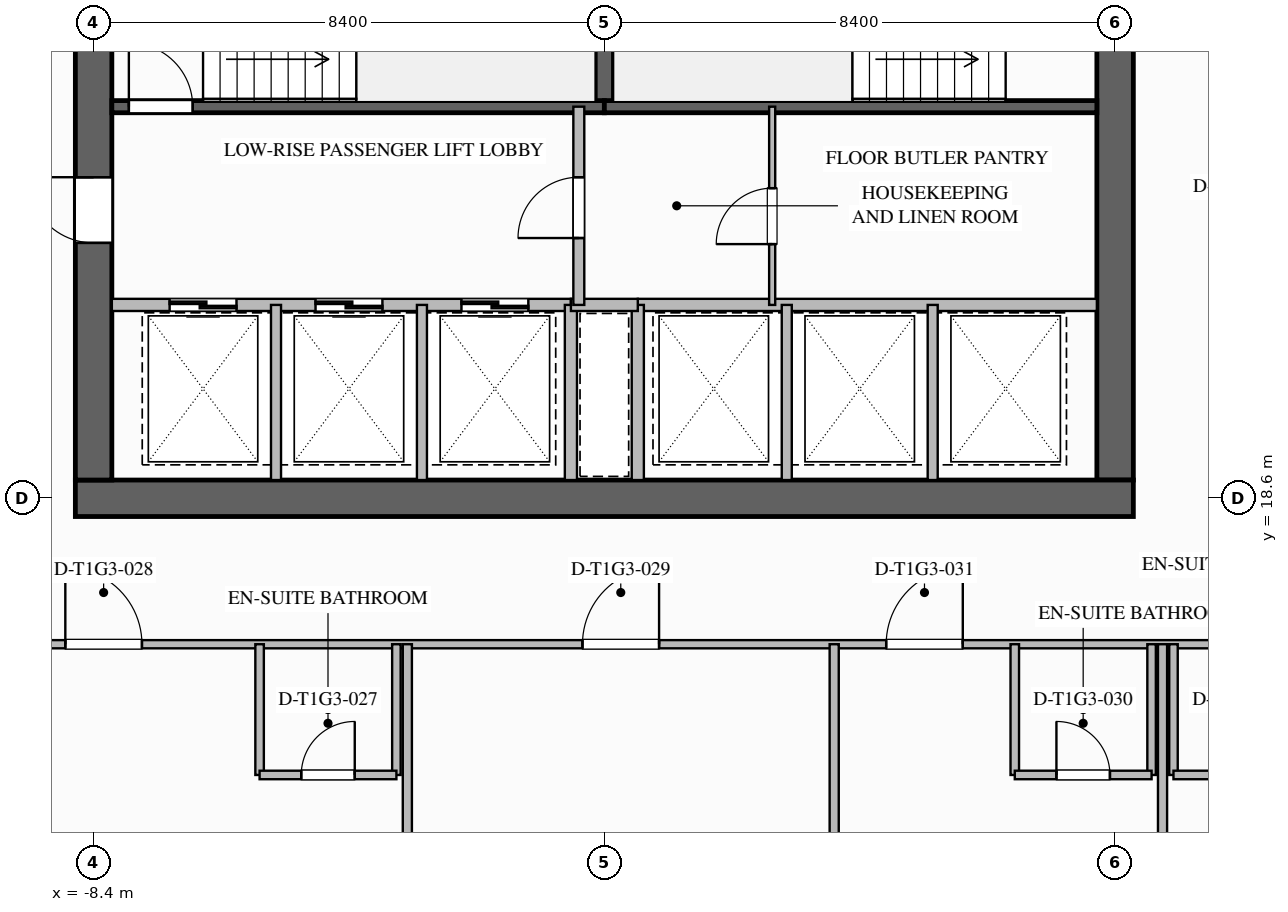
"""IFC4 building model, lengths in metres.
Left out: names, types, materials, properties, quantities, classifications, styles, units other than length and angle.
Written with IfcOpenShell. Run it as: python <this file> out.ifc"""

import sys

from ifc_helpers import new_model, si_unit, direction, frame, frame_2d, origin, place, context, subcontext, project, spatial, rectangle, extrude, element, fill, save


model = new_model("IFC4")
c1 = context("Model", 3, precision=1e-05, world=origin(), true_north=direction((0.0, 1.0)))
c2 = subcontext(c1, "Body", "Model", "MODEL_VIEW")
j1 = project(units=[si_unit("LENGTHUNIT", "METRE"), si_unit("PLANEANGLEUNIT", "RADIAN")], contexts=[c1])
p1 = place(None, origin())
s1 = spatial("IfcSite", under=j1, at=p1, CompositionType="ELEMENT")
p2 = place(p1, origin())
s2 = spatial("IfcBuilding", under=s1, at=p2, CompositionType="ELEMENT")
p3 = place(p2, frame((0.0, 0.0, 54.2)))
s3 = spatial("IfcBuildingStorey", under=s2, at=p3, CompositionType="ELEMENT", Elevation=54.2)
p4 = place(p3, frame((8.4, 35.1, 0.0), z_axis=(0.0, 0.0, 1.0), x_axis=(0.0, -1.0, 0.0)))
e1 = element("IfcWall", 1, at=p4, inside=s3, PredefinedType="SHEAR", context=c2, shape_type="SweptSolid", body=[
    extrude(rectangle(XDim=16.2, YDim=0.6, at=frame_2d((8.1, 0.0))), origin(), (0.0, 0.0, 1.0), 3.5),
])
p5 = place(p4, frame((3.08, 0.0, 0.0)))
e2 = element("IfcOpeningElement", 2, at=p5, cuts=e1, PredefinedType="OPENING", context=c2, shape_type="SweptSolid", body=[
    extrude(rectangle(XDim=1.12, YDim=2.1, at=frame_2d((0.56, 1.05))), frame((0.0, 0.31, 0.0), z_axis=(0.0, -1.0, 0.0), x_axis=(1.0, 0.0, 0.0)), (0.0, 0.0, 1.0), 0.62),
])
p6 = place(p3, frame((8.7, 18.6, 0.0), z_axis=(0.0, 0.0, 1.0), x_axis=(-1.0, 0.0, 0.0)))
e3 = element("IfcWall", 3, at=p6, inside=s3, PredefinedType="SHEAR", context=c2, shape_type="SweptSolid", body=[
    extrude(rectangle(XDim=17.4, YDim=0.6, at=frame_2d((8.7, 0.0))), origin(), (0.0, 0.0, 1.0), 3.5),
])
p7 = place(p3, frame((-8.4, 18.9, 0.0), z_axis=(0.0, 0.0, 1.0), x_axis=(0.0, 1.0, 0.0)))
e4 = element("IfcWall", 4, at=p7, inside=s3, PredefinedType="SHEAR", context=c2, shape_type="SweptSolid", body=[
    extrude(rectangle(XDim=16.2, YDim=0.6, at=frame_2d((8.1, 0.0))), origin(), (0.0, 0.0, 1.0), 3.5),
])
p8 = place(p7, frame((3.9, 0.0, 0.0)))
e5 = element("IfcOpeningElement", 5, at=p8, cuts=e4, PredefinedType="OPENING", context=c2, shape_type="SweptSolid", body=[
    extrude(rectangle(XDim=1.08, YDim=2.04, at=frame_2d((0.54, 1.02))), frame((0.0, 0.31, 0.0), z_axis=(0.0, -1.0, 0.0), x_axis=(1.0, 0.0, 0.0)), (0.0, 0.0, 1.0), 0.62),
])
p9 = place(p3, frame((0.0, 25.04, 0.0), z_axis=(0.0, 0.0, 1.0), x_axis=(0.0, 1.0, 0.0)))
e6 = element("IfcWall", 6, at=p9, inside=s3, PredefinedType="SOLIDWALL", context=c2, shape_type="SweptSolid", body=[
    extrude(rectangle(XDim=3.12, YDim=0.3, at=frame_2d((1.56, 0.0))), origin(), (0.0, 0.0, 1.0), 3.24),
])
p10 = place(p3, frame((-8.1, 25.04, 0.0), z_axis=(0.0, 0.0, 1.0), x_axis=(1.0, 0.0, 0.0)))
e7 = element("IfcWall", 7, at=p10, inside=s3, PredefinedType="SOLIDWALL", context=c2, shape_type="SweptSolid", body=[
    extrude(rectangle(XDim=8.1, YDim=0.2, at=frame_2d((4.05, 0.0))), origin(), (0.0, 0.0, 1.0), 3.24),
])
p11 = place(p10, frame((0.28, 0.0, 0.0)))
e8 = element("IfcOpeningElement", 8, at=p11, cuts=e7, PredefinedType="OPENING", context=c2, shape_type="SweptSolid", body=[
    extrude(rectangle(XDim=1.05, YDim=2.1, at=frame_2d((0.525, 1.05))), frame((0.0, 0.11, 0.0), z_axis=(0.0, -1.0, 0.0), x_axis=(1.0, 0.0, 0.0)), (0.0, 0.0, 1.0), 0.22),
])
p12 = place(p3, frame((0.0, 25.04, 0.0), z_axis=(0.0, 0.0, 1.0), x_axis=(1.0, 0.0, 0.0)))
e9 = element("IfcWall", 9, at=p12, inside=s3, PredefinedType="SOLIDWALL", context=c2, shape_type="SweptSolid", body=[
    extrude(rectangle(XDim=8.1, YDim=0.2, at=frame_2d((4.05, 0.0))), origin(), (0.0, 0.0, 1.0), 3.24),
])
p13 = place(p3, frame((-0.55, 21.78, 0.0), z_axis=(0.0, 0.0, 1.0), x_axis=(-1.0, 0.0, 0.0)))
e10 = element("IfcWall", 10, at=p13, inside=s3, PredefinedType="SOLIDWALL", context=c2, shape_type="SweptSolid", body=[
    extrude(rectangle(XDim=7.55, YDim=0.2, at=frame_2d((3.775, 0.0))), origin(), (0.0, 0.0, 1.0), 3.24),
])
p14 = place(p13, frame((5.5, 0.0, 0.0)))
e11 = element("IfcOpeningElement", 11, at=p14, cuts=e10, PredefinedType="OPENING", context=c2, shape_type="SweptSolid", body=[
    extrude(rectangle(XDim=1.1, YDim=2.2, at=frame_2d((0.55, 1.1))), frame((0.0, 0.11, 0.0), z_axis=(0.0, -1.0, 0.0), x_axis=(1.0, 0.0, 0.0)), (0.0, 0.0, 1.0), 0.22),
])
p15 = place(p13, frame((3.1, 0.0, 0.0)))
e12 = element("IfcOpeningElement", 12, at=p15, cuts=e10, PredefinedType="OPENING", context=c2, shape_type="SweptSolid", body=[
    extrude(rectangle(XDim=1.1, YDim=2.2, at=frame_2d((0.55, 1.1))), frame((0.0, 0.11, 0.0), z_axis=(0.0, -1.0, 0.0), x_axis=(1.0, 0.0, 0.0)), (0.0, 0.0, 1.0), 0.22),
])
p16 = place(p13, frame((0.7, 0.0, 0.0)))
e13 = element("IfcOpeningElement", 13, at=p16, cuts=e10, PredefinedType="OPENING", context=c2, shape_type="SweptSolid", body=[
    extrude(rectangle(XDim=1.1, YDim=2.2, at=frame_2d((0.55, 1.1))), frame((0.0, 0.11, 0.0), z_axis=(0.0, -1.0, 0.0), x_axis=(1.0, 0.0, 0.0)), (0.0, 0.0, 1.0), 0.22),
])
for number, where, z_axis, x_axis in (
    (14, (-5.4, 18.9, 0.0), (0.0, 0.0, 1.0), (0.0, 1.0, 0.0)),
    (15, (-3.0, 18.9, 0.0), (0.0, 0.0, 1.0), (0.0, 1.0, 0.0)),
):
    element("IfcWall", number, at=place(p3, frame(where, z_axis=z_axis, x_axis=x_axis)), inside=s3, PredefinedType="PARTITIONING", context=c2, shape_type="SweptSolid", body=[
        extrude(rectangle(XDim=2.88, YDim=0.165, at=frame_2d((1.44, 0.0))), origin(), (0.0, 0.0, 1.0), 3.24),
    ])
p17 = place(p3, frame((-0.55, 18.9, 0.0), z_axis=(0.0, 0.0, 1.0), x_axis=(0.0, 1.0, 0.0)))
e16 = element("IfcWall", 16, at=p17, inside=s3, PredefinedType="SOLIDWALL", context=c2, shape_type="SweptSolid", body=[
    extrude(rectangle(XDim=2.88, YDim=0.2, at=frame_2d((1.44, 0.0))), origin(), (0.0, 0.0, 1.0), 3.24),
])
p18 = place(p3, frame((8.1, 21.78, 0.0), z_axis=(0.0, 0.0, 1.0), x_axis=(-1.0, 0.0, 0.0)))
e17 = element("IfcWall", 17, at=p18, inside=s3, PredefinedType="SOLIDWALL", context=c2, shape_type="SweptSolid", body=[
    extrude(rectangle(XDim=7.55, YDim=0.2, at=frame_2d((3.775, 0.0))), origin(), (0.0, 0.0, 1.0), 3.24),
])
p19 = place(p3, frame((0.55, 18.9, 0.0), z_axis=(0.0, 0.0, 1.0), x_axis=(0.0, 1.0, 0.0)))
e18 = element("IfcWall", 18, at=p19, inside=s3, PredefinedType="SOLIDWALL", context=c2, shape_type="SweptSolid", body=[
    extrude(rectangle(XDim=2.88, YDim=0.2, at=frame_2d((1.44, 0.0))), origin(), (0.0, 0.0, 1.0), 3.24),
])
for number, where, z_axis, x_axis in (
    (19, (3.0, 18.9, 0.0), (0.0, 0.0, 1.0), (0.0, 1.0, 0.0)),
    (20, (5.4, 18.9, 0.0), (0.0, 0.0, 1.0), (0.0, 1.0, 0.0)),
):
    element("IfcWall", number, at=place(p3, frame(where, z_axis=z_axis, x_axis=x_axis)), inside=s3, PredefinedType="PARTITIONING", context=c2, shape_type="SweptSolid", body=[
        extrude(rectangle(XDim=2.88, YDim=0.165, at=frame_2d((1.44, 0.0))), origin(), (0.0, 0.0, 1.0), 3.24),
    ])
p20 = place(p3, frame((-0.55, 21.78, 0.0), z_axis=(0.0, 0.0, 1.0), x_axis=(1.0, 0.0, 0.0)))
e21 = element("IfcWall", 21, at=p20, inside=s3, PredefinedType="SOLIDWALL", context=c2, shape_type="SweptSolid", body=[
    extrude(rectangle(XDim=1.1, YDim=0.2, at=frame_2d((0.55, 0.0))), origin(), (0.0, 0.0, 1.0), 3.24),
])
p21 = place(p3, frame((-0.42, 21.78, 0.0), z_axis=(0.0, 0.0, 1.0), x_axis=(0.0, 1.0, 0.0)))
e22 = element("IfcWall", 22, at=p21, inside=s3, PredefinedType="SOLIDWALL", context=c2, shape_type="SweptSolid", body=[
    extrude(rectangle(XDim=3.26, YDim=0.18, at=frame_2d((1.63, 0.0))), origin(), (0.0, 0.0, 1.0), 3.24),
])
p22 = place(p21, frame((1.1, 0.0, 0.0)))
e23 = element("IfcOpeningElement", 23, at=p22, cuts=e22, PredefinedType="OPENING", context=c2, shape_type="SweptSolid", body=[
    extrude(rectangle(XDim=1.0, YDim=2.1, at=frame_2d((0.5, 1.05))), frame((0.0, 0.1, 0.0), z_axis=(0.0, -1.0, 0.0), x_axis=(1.0, 0.0, 0.0)), (0.0, 0.0, 1.0), 0.2),
])
p23 = place(p3, frame((2.76, 21.78, 0.0), z_axis=(0.0, 0.0, 1.0), x_axis=(0.0, 1.0, 0.0)))
e24 = element("IfcWall", 24, at=p23, inside=s3, PredefinedType="PARTITIONING", context=c2, shape_type="SweptSolid", body=[
    extrude(rectangle(XDim=3.26, YDim=0.1, at=frame_2d((1.63, 0.0))), origin(), (0.0, 0.0, 1.0), 3.24),
])
p24 = place(p23, frame((1.0, 0.0, 0.0)))
e25 = element("IfcOpeningElement", 25, at=p24, cuts=e24, PredefinedType="OPENING", context=c2, shape_type="SweptSolid", body=[
    extrude(rectangle(XDim=0.92, YDim=2.1, at=frame_2d((0.46, 1.05))), frame((0.0, 0.06, 0.0), z_axis=(0.0, -1.0, 0.0), x_axis=(1.0, 0.0, 0.0)), (0.0, 0.0, 1.0), 0.12),
])
p25 = place(p3, frame((-16.2, 16.2, 0.0), z_axis=(0.0, 0.0, 1.0), x_axis=(1.0, 0.0, 0.0)))
e26 = element("IfcWall", 26, at=p25, inside=s3, PredefinedType="PARTITIONING", context=c2, shape_type="SweptSolid", body=[
    extrude(rectangle(XDim=32.4, YDim=0.135, at=frame_2d((16.2, 0.0))), origin(), (0.0, 0.0, 1.0), 3.24),
])
p26 = place(p25, frame((3.285, 0.0, 0.0)))
e27 = element("IfcOpeningElement", 27, at=p26, cuts=e26, PredefinedType="OPENING", context=c2, shape_type="SweptSolid", body=[
    extrude(rectangle(XDim=1.26, YDim=2.2, at=frame_2d((0.63, 1.1))), frame((0.0, 0.077, 0.0), z_axis=(0.0, -1.0, 0.0), x_axis=(1.0, 0.0, 0.0)), (0.0, 0.0, 1.0), 0.155),
])
p27 = place(p25, frame((7.335, 0.0, 0.0)))
e28 = element("IfcOpeningElement", 28, at=p27, cuts=e26, PredefinedType="OPENING", context=c2, shape_type="SweptSolid", body=[
    extrude(rectangle(XDim=1.26, YDim=2.2, at=frame_2d((0.63, 1.1))), frame((0.0, 0.077, 0.0), z_axis=(0.0, -1.0, 0.0), x_axis=(1.0, 0.0, 0.0)), (0.0, 0.0, 1.0), 0.155),
])
p28 = place(p25, frame((15.84, 0.0, 0.0)))
e29 = element("IfcOpeningElement", 29, at=p28, cuts=e26, PredefinedType="OPENING", context=c2, shape_type="SweptSolid", body=[
    extrude(rectangle(XDim=1.26, YDim=2.2, at=frame_2d((0.63, 1.1))), frame((0.0, 0.077, 0.0), z_axis=(0.0, -1.0, 0.0), x_axis=(1.0, 0.0, 0.0)), (0.0, 0.0, 1.0), 0.155),
])
p29 = place(p25, frame((20.835, 0.0, 0.0)))
e30 = element("IfcOpeningElement", 30, at=p29, cuts=e26, PredefinedType="OPENING", context=c2, shape_type="SweptSolid", body=[
    extrude(rectangle(XDim=1.26, YDim=2.2, at=frame_2d((0.63, 1.1))), frame((0.0, 0.077, 0.0), z_axis=(0.0, -1.0, 0.0), x_axis=(1.0, 0.0, 0.0)), (0.0, 0.0, 1.0), 0.155),
])
p30 = place(p25, frame((29.475, 0.0, 0.0)))
e31 = element("IfcOpeningElement", 31, at=p30, cuts=e26, PredefinedType="OPENING", context=c2, shape_type="SweptSolid", body=[
    extrude(rectangle(XDim=1.26, YDim=2.2, at=frame_2d((0.63, 1.1))), frame((0.0, 0.077, 0.0), z_axis=(0.0, -1.0, 0.0), x_axis=(1.0, 0.0, 0.0)), (0.0, 0.0, 1.0), 0.155),
])
for number, where, z_axis, x_axis in (
    (32, (-5.67, 16.2, 0.0), (0.0, 0.0, 1.0), (0.0, -1.0, 0.0)),
    (33, (-3.42, 16.2, 0.0), (0.0, 0.0, 1.0), (0.0, -1.0, 0.0)),
):
    element("IfcWall", number, at=place(p3, frame(where, z_axis=z_axis, x_axis=x_axis)), inside=s3, PredefinedType="PLUMBINGWALL", context=c2, shape_type="SweptSolid", body=[
        extrude(rectangle(XDim=2.15, YDim=0.14, at=frame_2d((1.075, 0.0))), origin(), (0.0, 0.0, 1.0), 3.24),
    ])
p31 = place(p3, frame((-5.67, 14.05, 0.0), z_axis=(0.0, 0.0, 1.0), x_axis=(1.0, 0.0, 0.0)))
e34 = element("IfcWall", 34, at=p31, inside=s3, PredefinedType="PLUMBINGWALL", context=c2, shape_type="SweptSolid", body=[
    extrude(rectangle(XDim=2.25, YDim=0.14, at=frame_2d((1.125, 0.0))), origin(), (0.0, 0.0, 1.0), 3.24),
])
p32 = place(p31, frame((0.685, 0.0, 0.0)))
e35 = element("IfcOpeningElement", 35, at=p32, cuts=e34, PredefinedType="OPENING", context=c2, shape_type="SweptSolid", body=[
    extrude(rectangle(XDim=0.88, YDim=2.1, at=frame_2d((0.44, 1.05))), frame((0.0, 0.08, 0.0), z_axis=(0.0, -1.0, 0.0), x_axis=(1.0, 0.0, 0.0)), (0.0, 0.0, 1.0), 0.16),
])
for number, where, z_axis, x_axis in (
    (36, (-3.24, 0.8, 0.0), (0.0, 0.0, 1.0), (0.0, 1.0, 0.0)),
    (37, (3.78, 0.8, 0.0), (0.0, 0.0, 1.0), (0.0, 1.0, 0.0)),
):
    element("IfcWall", number, at=place(p3, frame(where, z_axis=z_axis, x_axis=x_axis)), inside=s3, PredefinedType="PARTITIONING", context=c2, shape_type="SweptSolid", body=[
        extrude(rectangle(XDim=15.4, YDim=0.15, at=frame_2d((7.7, 0.0))), origin(), (0.0, 0.0, 1.0), 3.24),
    ])
for number, where, z_axis, x_axis in (
    (38, (6.75, 16.2, 0.0), (0.0, 0.0, 1.0), (0.0, -1.0, 0.0)),
    (39, (9.0, 16.2, 0.0), (0.0, 0.0, 1.0), (0.0, -1.0, 0.0)),
):
    element("IfcWall", number, at=place(p3, frame(where, z_axis=z_axis, x_axis=x_axis)), inside=s3, PredefinedType="PLUMBINGWALL", context=c2, shape_type="SweptSolid", body=[
        extrude(rectangle(XDim=2.15, YDim=0.14, at=frame_2d((1.075, 0.0))), origin(), (0.0, 0.0, 1.0), 3.24),
    ])
p33 = place(p3, frame((6.75, 14.05, 0.0), z_axis=(0.0, 0.0, 1.0), x_axis=(1.0, 0.0, 0.0)))
e40 = element("IfcWall", 40, at=p33, inside=s3, PredefinedType="PLUMBINGWALL", context=c2, shape_type="SweptSolid", body=[
    extrude(rectangle(XDim=2.25, YDim=0.14, at=frame_2d((1.125, 0.0))), origin(), (0.0, 0.0, 1.0), 3.24),
])
p34 = place(p33, frame((0.685, 0.0, 0.0)))
e41 = element("IfcOpeningElement", 41, at=p34, cuts=e40, PredefinedType="OPENING", context=c2, shape_type="SweptSolid", body=[
    extrude(rectangle(XDim=0.88, YDim=2.1, at=frame_2d((0.44, 1.05))), frame((0.0, 0.08, 0.0), z_axis=(0.0, -1.0, 0.0), x_axis=(1.0, 0.0, 0.0)), (0.0, 0.0, 1.0), 0.16),
])
p35 = place(p3, frame((9.18, 0.12, 0.0), z_axis=(0.0, 0.0, 1.0), x_axis=(0.0, 1.0, 0.0)))
e42 = element("IfcWall", 42, at=p35, inside=s3, PredefinedType="PARTITIONING", context=c2, shape_type="SweptSolid", body=[
    extrude(rectangle(XDim=16.08, YDim=0.15, at=frame_2d((8.04, 0.0))), origin(), (0.0, 0.0, 1.0), 3.24),
])
p36 = place(p3, frame((9.36, 16.2, 0.0), z_axis=(0.0, 0.0, 1.0), x_axis=(0.0, -1.0, 0.0)))
e43 = element("IfcWall", 43, at=p36, inside=s3, PredefinedType="PLUMBINGWALL", context=c2, shape_type="SweptSolid", body=[
    extrude(rectangle(XDim=2.15, YDim=0.14, at=frame_2d((1.075, 0.0))), origin(), (0.0, 0.0, 1.0), 3.24),
])
p37 = place(p3, frame((9.36, 14.05, 0.0), z_axis=(0.0, 0.0, 1.0), x_axis=(1.0, 0.0, 0.0)))
e44 = element("IfcWall", 44, at=p37, inside=s3, PredefinedType="PLUMBINGWALL", context=c2, shape_type="SweptSolid", body=[
    extrude(rectangle(XDim=2.25, YDim=0.14, at=frame_2d((1.125, 0.0))), origin(), (0.0, 0.0, 1.0), 3.24),
])
p38 = place(p37, frame((0.685, 0.0, 0.0)))
e45 = element("IfcOpeningElement", 45, at=p38, cuts=e44, PredefinedType="OPENING", context=c2, shape_type="SweptSolid", body=[
    extrude(rectangle(XDim=0.88, YDim=2.1, at=frame_2d((0.44, 1.05))), frame((0.0, 0.08, 0.0), z_axis=(0.0, -1.0, 0.0), x_axis=(1.0, 0.0, 0.0)), (0.0, 0.0, 1.0), 0.16),
])
p39 = place(p11, origin())
e46 = element("IfcDoor", 46, at=p39, inside=s3, OperationType="SINGLE_SWING_LEFT", PredefinedType="DOOR", context=c2, shape_type="SweptSolid", body=[
    extrude(rectangle(XDim=1.05, YDim=2.1, at=frame_2d((0.525, 1.05))), frame((0.0, 0.025, 0.0), z_axis=(0.0, -1.0, 0.0), x_axis=(1.0, 0.0, 0.0)), (0.0, 0.0, 1.0), 0.05),
])
fill(e8, e46)
p40 = place(p14, origin())
e47 = element("IfcDoor", 47, at=p40, inside=s3, OperationType="SLIDING_TO_LEFT", PredefinedType="DOOR", context=c2, shape_type="SweptSolid", body=[
    extrude(rectangle(XDim=1.1, YDim=2.2, at=frame_2d((0.55, 1.1))), frame((0.0, 0.025, 0.0), z_axis=(0.0, -1.0, 0.0), x_axis=(1.0, 0.0, 0.0)), (0.0, 0.0, 1.0), 0.05),
])
fill(e11, e47)
p41 = place(p15, origin())
e48 = element("IfcDoor", 48, at=p41, inside=s3, OperationType="SLIDING_TO_LEFT", PredefinedType="DOOR", context=c2, shape_type="SweptSolid", body=[
    extrude(rectangle(XDim=1.1, YDim=2.2, at=frame_2d((0.55, 1.1))), frame((0.0, 0.025, 0.0), z_axis=(0.0, -1.0, 0.0), x_axis=(1.0, 0.0, 0.0)), (0.0, 0.0, 1.0), 0.05),
])
fill(e12, e48)
p42 = place(p16, origin())
e49 = element("IfcDoor", 49, at=p42, inside=s3, OperationType="SLIDING_TO_LEFT", PredefinedType="DOOR", context=c2, shape_type="SweptSolid", body=[
    extrude(rectangle(XDim=1.1, YDim=2.2, at=frame_2d((0.55, 1.1))), frame((0.0, 0.025, 0.0), z_axis=(0.0, -1.0, 0.0), x_axis=(1.0, 0.0, 0.0)), (0.0, 0.0, 1.0), 0.05),
])
fill(e13, e49)
p43 = place(p22, origin())
e50 = element("IfcDoor", 50, at=p43, inside=s3, OperationType="SINGLE_SWING_LEFT", PredefinedType="DOOR", context=c2, shape_type="SweptSolid", body=[
    extrude(rectangle(XDim=1.0, YDim=2.1, at=frame_2d((0.5, 1.05))), frame((0.0, 0.025, 0.0), z_axis=(0.0, -1.0, 0.0), x_axis=(1.0, 0.0, 0.0)), (0.0, 0.0, 1.0), 0.05),
])
fill(e23, e50)
p44 = place(p8, origin())
e51 = element("IfcDoor", 51, at=p44, inside=s3, OperationType="SINGLE_SWING_RIGHT", PredefinedType="DOOR", context=c2, shape_type="SweptSolid", body=[
    extrude(rectangle(XDim=1.08, YDim=2.04, at=frame_2d((0.54, 1.02))), frame((0.0, 0.025, 0.0), z_axis=(0.0, -1.0, 0.0), x_axis=(1.0, 0.0, 0.0)), (0.0, 0.0, 1.0), 0.05),
])
fill(e5, e51)
p45 = place(p24, origin())
e52 = element("IfcDoor", 52, at=p45, inside=s3, OperationType="SINGLE_SWING_LEFT", PredefinedType="DOOR", context=c2, shape_type="SweptSolid", body=[
    extrude(rectangle(XDim=0.92, YDim=2.1, at=frame_2d((0.46, 1.05))), frame((0.0, 0.025, 0.0), z_axis=(0.0, -1.0, 0.0), x_axis=(1.0, 0.0, 0.0)), (0.0, 0.0, 1.0), 0.05),
])
fill(e25, e52)
p46 = place(p32, origin())
e53 = element("IfcDoor", 53, at=p46, inside=s3, OperationType="SINGLE_SWING_RIGHT", PredefinedType="DOOR", context=c2, shape_type="SweptSolid", body=[
    extrude(rectangle(XDim=0.88, YDim=2.1, at=frame_2d((0.44, 1.05))), frame((0.0, 0.025, 0.0), z_axis=(0.0, -1.0, 0.0), x_axis=(1.0, 0.0, 0.0)), (0.0, 0.0, 1.0), 0.05),
])
fill(e35, e53)
p47 = place(p27, origin())
e54 = element("IfcDoor", 54, at=p47, inside=s3, OperationType="SINGLE_SWING_LEFT", PredefinedType="DOOR", context=c2, shape_type="SweptSolid", body=[
    extrude(rectangle(XDim=1.26, YDim=2.2, at=frame_2d((0.63, 1.1))), frame((0.0, 0.025, 0.0), z_axis=(0.0, -1.0, 0.0), x_axis=(1.0, 0.0, 0.0)), (0.0, 0.0, 1.0), 0.05),
])
fill(e28, e54)
p48 = place(p28, origin())
e55 = element("IfcDoor", 55, at=p48, inside=s3, OperationType="SINGLE_SWING_RIGHT", PredefinedType="DOOR", context=c2, shape_type="SweptSolid", body=[
    extrude(rectangle(XDim=1.26, YDim=2.2, at=frame_2d((0.63, 1.1))), frame((0.0, 0.025, 0.0), z_axis=(0.0, -1.0, 0.0), x_axis=(1.0, 0.0, 0.0)), (0.0, 0.0, 1.0), 0.05),
])
fill(e29, e55)
p49 = place(p34, origin())
e56 = element("IfcDoor", 56, at=p49, inside=s3, OperationType="SINGLE_SWING_LEFT", PredefinedType="DOOR", context=c2, shape_type="SweptSolid", body=[
    extrude(rectangle(XDim=0.88, YDim=2.1, at=frame_2d((0.44, 1.05))), frame((0.0, 0.025, 0.0), z_axis=(0.0, -1.0, 0.0), x_axis=(1.0, 0.0, 0.0)), (0.0, 0.0, 1.0), 0.05),
])
fill(e41, e56)
p50 = place(p29, origin())
e57 = element("IfcDoor", 57, at=p50, inside=s3, OperationType="SINGLE_SWING_RIGHT", PredefinedType="DOOR", context=c2, shape_type="SweptSolid", body=[
    extrude(rectangle(XDim=1.26, YDim=2.2, at=frame_2d((0.63, 1.1))), frame((0.0, 0.025, 0.0), z_axis=(0.0, -1.0, 0.0), x_axis=(1.0, 0.0, 0.0)), (0.0, 0.0, 1.0), 0.05),
])
fill(e30, e57)
save(model, sys.argv[1])
